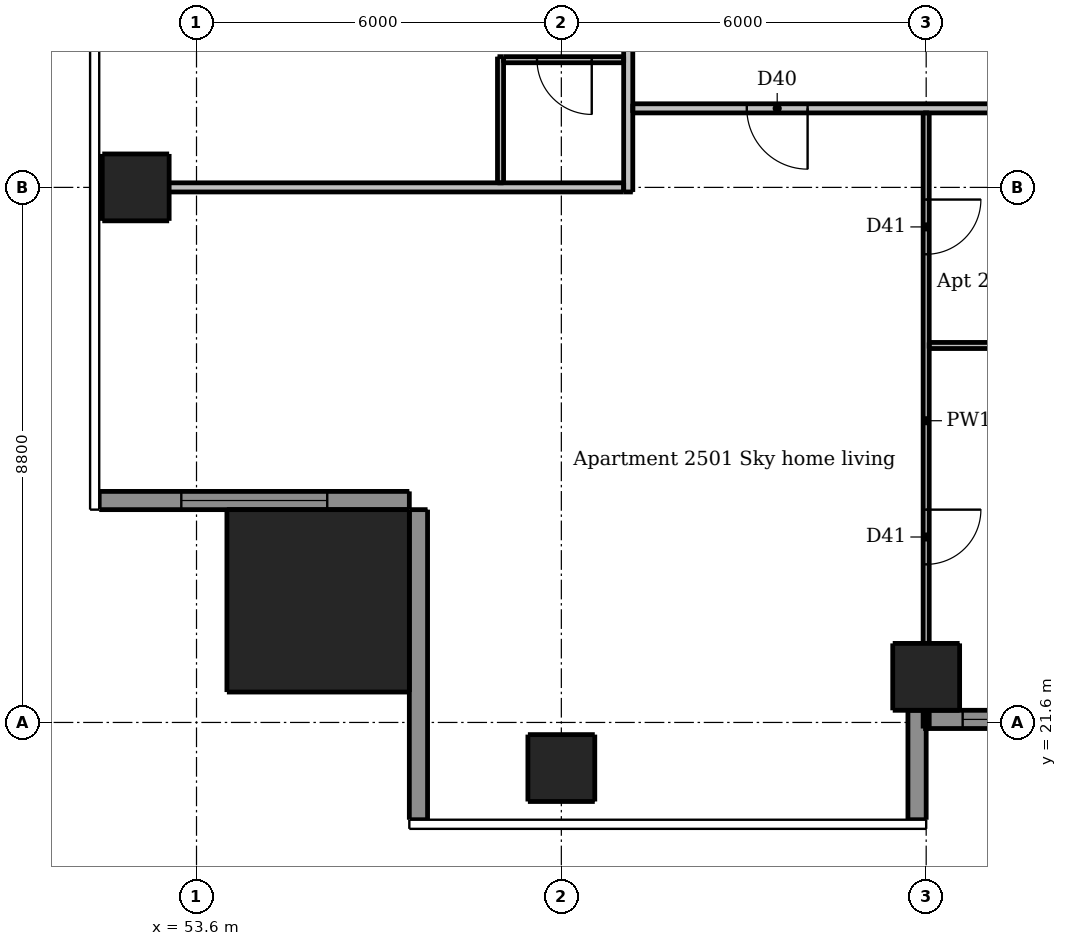
"""IFC4 building model, lengths in metres.
Left out: names, types, materials, properties, quantities, classifications, styles, units other than length and angle.
Written with IfcOpenShell. Run it as: python <this file> out.ifc"""

import sys

from ifc_helpers import new_model, si_unit, direction, frame, frame_2d, origin, origin_2d, place, context, subcontext, project, spatial, rectangle, extrude, element, fill, save


model = new_model("IFC4")
c1 = context("Model", 3, precision=1e-05, world=origin(), true_north=direction((0.0, 1.0)))
c2 = subcontext(c1, "Body", "Model", "MODEL_VIEW")
j1 = project(units=[si_unit("LENGTHUNIT", "METRE"), si_unit("PLANEANGLEUNIT", "RADIAN")], contexts=[c1])
p1 = place(None, origin())
s1 = spatial("IfcSite", under=j1, at=p1, CompositionType="ELEMENT")
p2 = place(p1, origin())
s2 = spatial("IfcBuilding", under=s1, at=p2, CompositionType="ELEMENT")
p3 = place(p2, frame((0.0, 0.0, 95.2)))
s3 = spatial("IfcBuildingStorey", under=s2, at=p3, CompositionType="ELEMENT", Elevation=95.2)
for number, where, z_axis, x_axis in (
    (1, (59.6, 20.85, 0.0), (0.0, 0.0, 1.0), (1.0, 0.0, 0.0)),
    (2, (65.6, 22.35, 0.0), (0.0, 0.0, 1.0), (1.0, 0.0, 0.0)),
    (3, (52.6, 30.4, 0.0), (0.0, 0.0, 1.0), (1.0, 0.0, 0.0)),
):
    element("IfcColumn", number, at=place(p3, frame(where, z_axis=z_axis, x_axis=x_axis)), inside=s3, PredefinedType="COLUMN", context=c2, shape_type="SweptSolid", body=[
        extrude(rectangle(XDim=1.1, YDim=1.1, at=origin_2d()), origin(), (0.0, 0.0, 1.0), 3.05),
    ])
p4 = place(p3, frame((55.6, 23.6, 0.0), z_axis=(0.0, 0.0, 1.0), x_axis=(1.0, 0.0, 0.0)))
e4 = element("IfcColumn", 4, at=p4, inside=s3, PredefinedType="COLUMN", context=c2, shape_type="SweptSolid", body=[
    extrude(rectangle(XDim=3.0, YDim=3.0, at=origin_2d()), origin(), (0.0, 0.0, 1.0), 3.3),
])
p5 = place(p3, frame((65.45, 20.0, 0.0), z_axis=(0.0, 0.0, 1.0), x_axis=(0.0, 1.0, 0.0)))
e5 = element("IfcWall", 5, at=p5, inside=s3, PredefinedType="SOLIDWALL", context=c2, shape_type="SweptSolid", body=[
    extrude(rectangle(XDim=1.8, YDim=0.3, at=frame_2d((0.9, 0.0))), origin(), (0.0, 0.0, 1.0), 3.05),
])
p6 = place(p3, frame((52.0, 25.25, 0.0), z_axis=(0.0, 0.0, 1.0), x_axis=(1.0, 0.0, 0.0)))
e6 = element("IfcWall", 6, at=p6, inside=s3, PredefinedType="SOLIDWALL", context=c2, shape_type="SweptSolid", body=[
    extrude(rectangle(XDim=5.1, YDim=0.3, at=frame_2d((2.55, 0.0))), origin(), (0.0, 0.0, 1.0), 3.05),
])
p7 = place(p6, frame((1.35, 0.0, 0.15)))
e7 = element("IfcOpeningElement", 7, at=p7, cuts=e6, PredefinedType="OPENING", context=c2, shape_type="SweptSolid", body=[
    extrude(rectangle(XDim=2.4, YDim=2.1, at=frame_2d((1.2, 1.05))), frame((0.0, 0.16, 0.0), z_axis=(0.0, -1.0, 0.0), x_axis=(1.0, 0.0, 0.0)), (0.0, 0.0, 1.0), 0.32),
])
p8 = place(p3, frame((57.25, 25.1, 0.0), z_axis=(0.0, 0.0, 1.0), x_axis=(0.0, -1.0, 0.0)))
e8 = element("IfcWall", 8, at=p8, inside=s3, PredefinedType="SOLIDWALL", context=c2, shape_type="SweptSolid", body=[
    extrude(rectangle(XDim=5.1, YDim=0.3, at=frame_2d((2.55, 0.0))), origin(), (0.0, 0.0, 1.0), 3.05),
])
p9 = place(p3, frame((65.6, 21.65, 0.0), z_axis=(0.0, 0.0, 1.0), x_axis=(1.0, 0.0, 0.0)))
e9 = element("IfcWall", 9, at=p9, inside=s3, PredefinedType="SOLIDWALL", context=c2, shape_type="SweptSolid", body=[
    extrude(rectangle(XDim=5.7, YDim=0.3, at=frame_2d((2.85, 0.0))), origin(), (0.0, 0.0, 1.0), 3.05),
])
p10 = place(p9, frame((0.6, 0.0, 0.15)))
e10 = element("IfcOpeningElement", 10, at=p10, cuts=e9, PredefinedType="OPENING", context=c2, shape_type="SweptSolid", body=[
    extrude(rectangle(XDim=1.8, YDim=2.1, at=frame_2d((0.9, 1.05))), frame((0.0, 0.16, 0.0), z_axis=(0.0, -1.0, 0.0), x_axis=(1.0, 0.0, 0.0)), (0.0, 0.0, 1.0), 0.32),
])
p11 = place(p9, frame((3.6, 0.0, 0.15)))
e11 = element("IfcOpeningElement", 11, at=p11, cuts=e9, PredefinedType="OPENING", context=c2, shape_type="SweptSolid", body=[
    extrude(rectangle(XDim=1.8, YDim=2.1, at=frame_2d((0.9, 1.05))), frame((0.0, 0.16, 0.0), z_axis=(0.0, -1.0, 0.0), x_axis=(1.0, 0.0, 0.0)), (0.0, 0.0, 1.0), 0.32),
])
p12 = place(p3, frame((58.6, 30.475, 0.0), z_axis=(0.0, 0.0, 1.0), x_axis=(0.0, 1.0, 0.0)))
e12 = element("IfcWall", 12, at=p12, inside=s3, PredefinedType="PARTITIONING", context=c2, shape_type="SweptSolid", body=[
    extrude(rectangle(XDim=2.075, YDim=0.1, at=frame_2d((1.038, 0.0))), origin(), (0.0, 0.0, 1.0), 3.05),
])
p13 = place(p3, frame((65.6, 31.625, 0.0), z_axis=(0.0, 0.0, 1.0), x_axis=(0.0, -1.0, 0.0)))
e13 = element("IfcWall", 13, at=p13, inside=s3, PredefinedType="PARTITIONING", context=c2, shape_type="SweptSolid", body=[
    extrude(rectangle(XDim=10.125, YDim=0.1, at=frame_2d((5.062, 0.0))), origin(), (0.0, 0.0, 1.0), 2.516),
])
p14 = place(p13, frame((1.425, 0.0, 0.0)))
e14 = element("IfcOpeningElement", 14, at=p14, cuts=e13, PredefinedType="OPENING", context=c2, shape_type="SweptSolid", body=[
    extrude(rectangle(XDim=0.9, YDim=2.1, at=frame_2d((0.45, 1.05))), frame((0.0, 0.06, 0.0), z_axis=(0.0, -1.0, 0.0), x_axis=(1.0, 0.0, 0.0)), (0.0, 0.0, 1.0), 0.12),
])
p15 = place(p13, frame((6.525, 0.0, 0.0)))
e15 = element("IfcOpeningElement", 15, at=p15, cuts=e13, PredefinedType="OPENING", context=c2, shape_type="SweptSolid", body=[
    extrude(rectangle(XDim=0.9, YDim=2.1, at=frame_2d((0.45, 1.05))), frame((0.0, 0.06, 0.0), z_axis=(0.0, -1.0, 0.0), x_axis=(1.0, 0.0, 0.0)), (0.0, 0.0, 1.0), 0.12),
])
p16 = place(p3, frame((60.625, 32.5, 0.0), z_axis=(0.0, 0.0, 1.0), x_axis=(-1.0, 0.0, 0.0)))
e16 = element("IfcWall", 16, at=p16, inside=s3, PredefinedType="PARTITIONING", context=c2, shape_type="SweptSolid", body=[
    extrude(rectangle(XDim=1.975, YDim=0.1, at=frame_2d((0.988, 0.0))), origin(), (0.0, 0.0, 1.0), 3.05),
])
p17 = place(p16, frame((0.525, 0.0, 0.0)))
e17 = element("IfcOpeningElement", 17, at=p17, cuts=e16, PredefinedType="OPENING", context=c2, shape_type="SweptSolid", body=[
    extrude(rectangle(XDim=0.9, YDim=2.1, at=frame_2d((0.45, 1.05))), frame((0.0, 0.06, 0.0), z_axis=(0.0, -1.0, 0.0), x_axis=(1.0, 0.0, 0.0)), (0.0, 0.0, 1.0), 0.12),
])
p18 = place(p3, frame((65.65, 27.8, 0.0), z_axis=(0.0, 0.0, 1.0), x_axis=(1.0, 0.0, 0.0)))
e18 = element("IfcWall", 18, at=p18, inside=s3, PredefinedType="PARTITIONING", context=c2, shape_type="SweptSolid", body=[
    extrude(rectangle(XDim=5.875, YDim=0.1, at=frame_2d((2.938, 0.0))), origin(), (0.0, 0.0, 1.0), 3.05),
])
p19 = place(p18, frame((3.75, 0.0, 0.0)))
e19 = element("IfcOpeningElement", 19, at=p19, cuts=e18, PredefinedType="OPENING", context=c2, shape_type="SweptSolid", body=[
    extrude(rectangle(XDim=0.8, YDim=2.1, at=frame_2d((0.4, 1.05))), frame((0.0, 0.06, 0.0), z_axis=(0.0, -1.0, 0.0), x_axis=(1.0, 0.0, 0.0)), (0.0, 0.0, 1.0), 0.12),
])
p20 = place(p3, frame((60.7, 30.325, 0.0), z_axis=(0.0, 0.0, 1.0), x_axis=(0.0, 1.0, 0.0)))
e20 = element("IfcWall", 20, at=p20, inside=s3, PredefinedType="PARTITIONING", context=c2, shape_type="SweptSolid", body=[
    extrude(rectangle(XDim=28.9, YDim=0.15, at=frame_2d((14.45, 0.0))), origin(), (0.0, 0.0, 1.0), 3.05),
])
p21 = place(p20, frame((2.575, 0.0, 0.0)))
e21 = element("IfcOpeningElement", 21, at=p21, cuts=e20, PredefinedType="OPENING", context=c2, shape_type="SweptSolid", body=[
    extrude(rectangle(XDim=1.0, YDim=2.1, at=frame_2d((0.5, 1.05))), frame((0.0, 0.085, 0.0), z_axis=(0.0, -1.0, 0.0), x_axis=(1.0, 0.0, 0.0)), (0.0, 0.0, 1.0), 0.17),
])
p22 = place(p20, frame((8.575, 0.0, 0.0)))
e22 = element("IfcOpeningElement", 22, at=p22, cuts=e20, PredefinedType="OPENING", context=c2, shape_type="SweptSolid", body=[
    extrude(rectangle(XDim=1.0, YDim=2.1, at=frame_2d((0.5, 1.05))), frame((0.0, 0.085, 0.0), z_axis=(0.0, -1.0, 0.0), x_axis=(1.0, 0.0, 0.0)), (0.0, 0.0, 1.0), 0.17),
])
p23 = place(p20, frame((14.575, 0.0, 0.0)))
e23 = element("IfcOpeningElement", 23, at=p23, cuts=e20, PredefinedType="OPENING", context=c2, shape_type="SweptSolid", body=[
    extrude(rectangle(XDim=1.0, YDim=2.1, at=frame_2d((0.5, 1.05))), frame((0.0, 0.085, 0.0), z_axis=(0.0, -1.0, 0.0), x_axis=(1.0, 0.0, 0.0)), (0.0, 0.0, 1.0), 0.17),
])
p24 = place(p20, frame((26.025, 0.0, 0.0)))
e24 = element("IfcOpeningElement", 24, at=p24, cuts=e20, PredefinedType="OPENING", context=c2, shape_type="SweptSolid", body=[
    extrude(rectangle(XDim=1.0, YDim=2.1, at=frame_2d((0.5, 1.05))), frame((0.0, 0.085, 0.0), z_axis=(0.0, -1.0, 0.0), x_axis=(1.0, 0.0, 0.0)), (0.0, 0.0, 1.0), 0.17),
])
p25 = place(p3, frame((89.525, 31.7, 0.0), z_axis=(0.0, 0.0, 1.0), x_axis=(-1.0, 0.0, 0.0)))
e25 = element("IfcWall", 25, at=p25, inside=s3, PredefinedType="PARTITIONING", context=c2, shape_type="SweptSolid", body=[
    extrude(rectangle(XDim=28.75, YDim=0.15, at=frame_2d((14.375, 0.0))), origin(), (0.0, 0.0, 1.0), 3.05),
])
p26 = place(p25, frame((25.875, 0.0, 0.0)))
e26 = element("IfcOpeningElement", 26, at=p26, cuts=e25, PredefinedType="OPENING", context=c2, shape_type="SweptSolid", body=[
    extrude(rectangle(XDim=1.0, YDim=2.1, at=frame_2d((0.5, 1.05))), frame((0.0, 0.085, 0.0), z_axis=(0.0, -1.0, 0.0), x_axis=(1.0, 0.0, 0.0)), (0.0, 0.0, 1.0), 0.17),
])
p27 = place(p25, frame((14.425, 0.0, 0.0)))
e27 = element("IfcOpeningElement", 27, at=p27, cuts=e25, PredefinedType="OPENING", context=c2, shape_type="SweptSolid", body=[
    extrude(rectangle(XDim=1.0, YDim=2.1, at=frame_2d((0.5, 1.05))), frame((0.0, 0.085, 0.0), z_axis=(0.0, -1.0, 0.0), x_axis=(1.0, 0.0, 0.0)), (0.0, 0.0, 1.0), 0.17),
])
p28 = place(p25, frame((8.425, 0.0, 0.0)))
e28 = element("IfcOpeningElement", 28, at=p28, cuts=e25, PredefinedType="OPENING", context=c2, shape_type="SweptSolid", body=[
    extrude(rectangle(XDim=1.0, YDim=2.1, at=frame_2d((0.5, 1.05))), frame((0.0, 0.085, 0.0), z_axis=(0.0, -1.0, 0.0), x_axis=(1.0, 0.0, 0.0)), (0.0, 0.0, 1.0), 0.17),
])
p29 = place(p25, frame((2.425, 0.0, 0.0)))
e29 = element("IfcOpeningElement", 29, at=p29, cuts=e25, PredefinedType="OPENING", context=c2, shape_type="SweptSolid", body=[
    extrude(rectangle(XDim=1.0, YDim=2.1, at=frame_2d((0.5, 1.05))), frame((0.0, 0.085, 0.0), z_axis=(0.0, -1.0, 0.0), x_axis=(1.0, 0.0, 0.0)), (0.0, 0.0, 1.0), 0.17),
])
p30 = place(p3, frame((52.0, 30.4, 0.0), z_axis=(0.0, 0.0, 1.0), x_axis=(1.0, 0.0, 0.0)))
e30 = element("IfcWall", 30, at=p30, inside=s3, PredefinedType="PARTITIONING", context=c2, shape_type="SweptSolid", body=[
    extrude(rectangle(XDim=8.625, YDim=0.15, at=frame_2d((4.312, 0.0))), origin(), (0.0, 0.0, 1.0), 2.647),
])
p31 = place(p7, origin())
e31 = element("IfcWindow", 31, at=p31, inside=s3, PartitioningType="DOUBLE_PANEL_VERTICAL", PredefinedType="WINDOW", context=c2, shape_type="SweptSolid", body=[
    extrude(rectangle(XDim=2.4, YDim=2.1, at=frame_2d((1.2, 1.05))), frame((0.0, 0.03, 0.0), z_axis=(0.0, -1.0, 0.0), x_axis=(1.0, 0.0, 0.0)), (0.0, 0.0, 1.0), 0.06),
])
fill(e7, e31)
p32 = place(p10, origin())
e32 = element("IfcWindow", 32, at=p32, inside=s3, PartitioningType="DOUBLE_PANEL_VERTICAL", PredefinedType="WINDOW", context=c2, shape_type="SweptSolid", body=[
    extrude(rectangle(XDim=1.8, YDim=2.1, at=frame_2d((0.9, 1.05))), frame((0.0, 0.03, 0.0), z_axis=(0.0, -1.0, 0.0), x_axis=(1.0, 0.0, 0.0)), (0.0, 0.0, 1.0), 0.06),
])
fill(e10, e32)
p33 = place(p26, origin())
e33 = element("IfcDoor", 33, at=p33, inside=s3, OperationType="SINGLE_SWING_LEFT", PredefinedType="DOOR", context=c2, shape_type="SweptSolid", body=[
    extrude(rectangle(XDim=1.0, YDim=2.1, at=frame_2d((0.5, 1.05))), frame((0.0, 0.025, 0.0), z_axis=(0.0, -1.0, 0.0), x_axis=(1.0, 0.0, 0.0)), (0.0, 0.0, 1.0), 0.05),
])
fill(e26, e33)
p34 = place(p14, origin())
e34 = element("IfcDoor", 34, at=p34, inside=s3, OperationType="SINGLE_SWING_LEFT", PredefinedType="DOOR", context=c2, shape_type="SweptSolid", body=[
    extrude(rectangle(XDim=0.9, YDim=2.1, at=frame_2d((0.45, 1.05))), frame((0.0, 0.025, 0.0), z_axis=(0.0, -1.0, 0.0), x_axis=(1.0, 0.0, 0.0)), (0.0, 0.0, 1.0), 0.05),
])
fill(e14, e34)
p35 = place(p15, origin())
e35 = element("IfcDoor", 35, at=p35, inside=s3, OperationType="SINGLE_SWING_LEFT", PredefinedType="DOOR", context=c2, shape_type="SweptSolid", body=[
    extrude(rectangle(XDim=0.9, YDim=2.1, at=frame_2d((0.45, 1.05))), frame((0.0, 0.025, 0.0), z_axis=(0.0, -1.0, 0.0), x_axis=(1.0, 0.0, 0.0)), (0.0, 0.0, 1.0), 0.05),
])
fill(e15, e35)
p36 = place(p17, origin())
e36 = element("IfcDoor", 36, at=p36, inside=s3, OperationType="SINGLE_SWING_LEFT", PredefinedType="DOOR", context=c2, shape_type="SweptSolid", body=[
    extrude(rectangle(XDim=0.9, YDim=2.1, at=frame_2d((0.45, 1.05))), frame((0.0, 0.025, 0.0), z_axis=(0.0, -1.0, 0.0), x_axis=(1.0, 0.0, 0.0)), (0.0, 0.0, 1.0), 0.05),
])
fill(e17, e36)
save(model, sys.argv[1])
